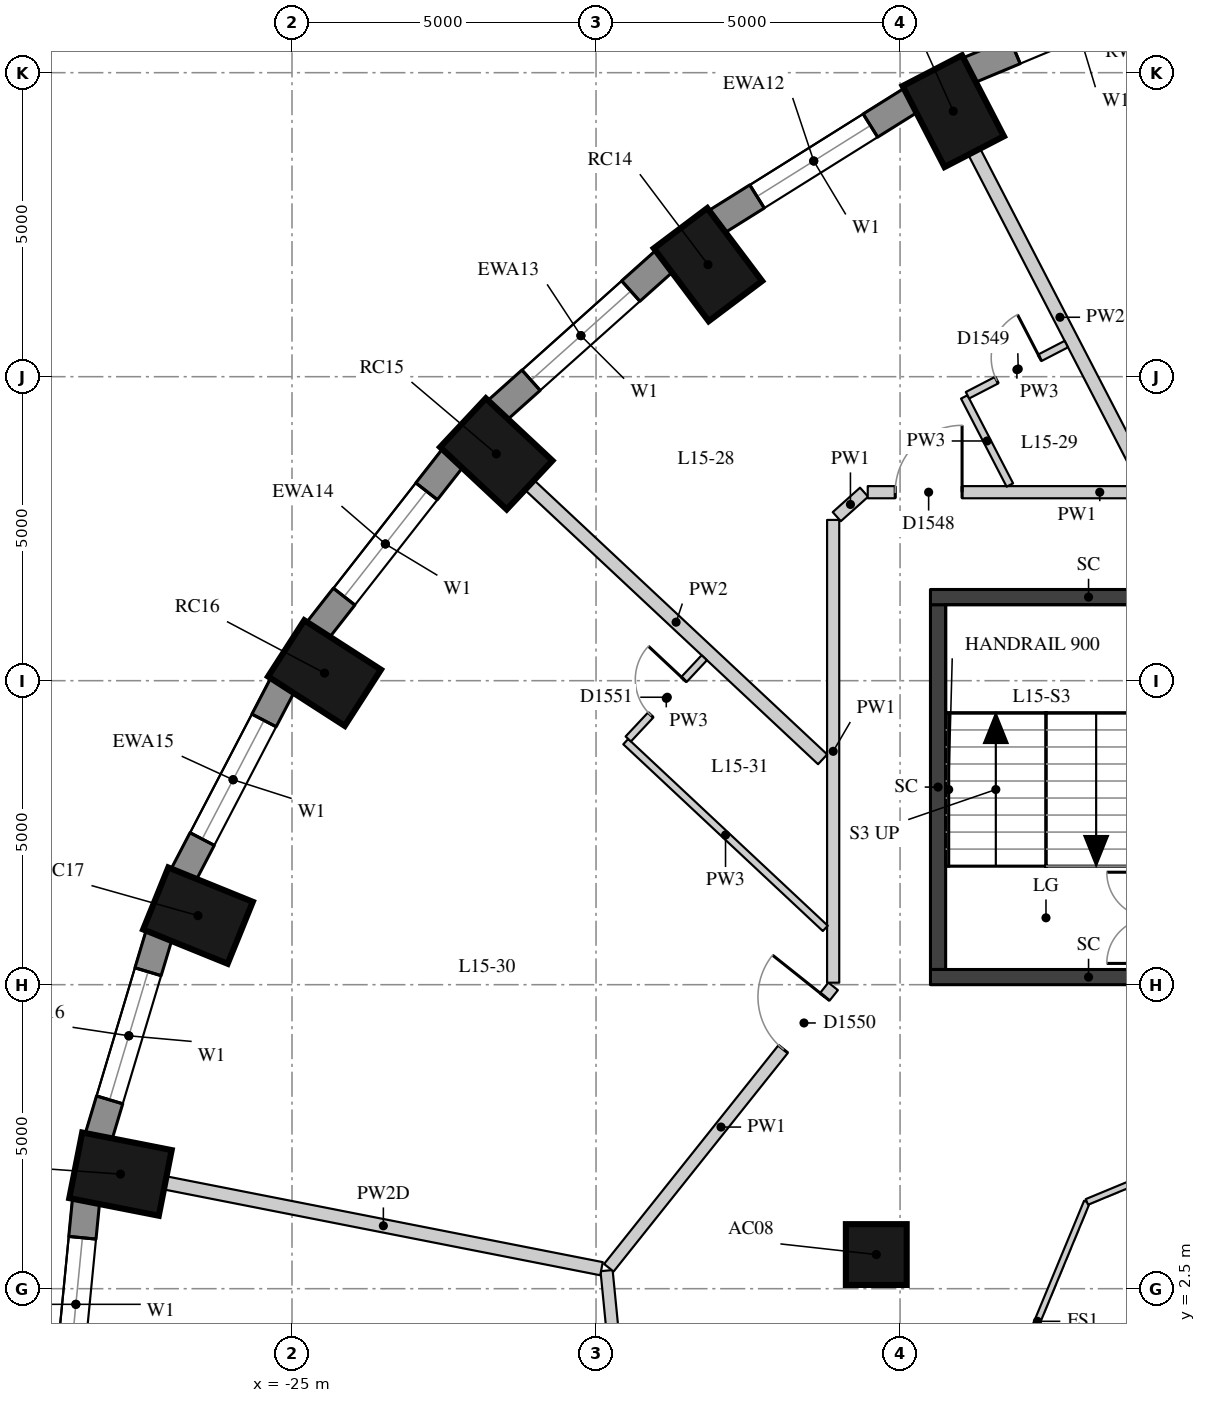
"""IFC4 building model, lengths in metres.
Left out: names, types, materials, properties, quantities, classifications, styles, units other than length and angle.
Written with IfcOpenShell. Run it as: python <this file> out.ifc"""

import sys

from ifc_helpers import new_model, si_unit, direction, frame, frame_2d, origin, origin_2d, place, context, subcontext, project, spatial, rectangle, extrude, element, fill, save


model = new_model("IFC4")
c1 = context("Model", 3, precision=1e-05, world=origin(), true_north=direction((0.0, 1.0)))
c2 = subcontext(c1, "Body", "Model", "MODEL_VIEW")
j1 = project(units=[si_unit("LENGTHUNIT", "METRE"), si_unit("PLANEANGLEUNIT", "RADIAN")], contexts=[c1])
p1 = place(None, origin())
s1 = spatial("IfcSite", under=j1, at=p1, CompositionType="ELEMENT")
p2 = place(p1, origin())
s2 = spatial("IfcBuilding", under=s1, at=p2, CompositionType="ELEMENT")
p3 = place(p2, frame((0.0, 0.0, 58.0)))
s3 = spatial("IfcBuildingStorey", under=s2, at=p3, CompositionType="ELEMENT", Elevation=58.0)
for number, where, z_axis, x_axis in (
    (1, (-14.125, 21.867, 0.0), (0.0, 0.0, 1.0), (-0.46, 0.888, 0.0)),
    (2, (-18.159, 19.343, 0.0), (0.0, 0.0, 1.0), (-0.601, 0.799, 0.0)),
    (3, (-21.641, 16.23, 0.0), (0.0, 0.0, 1.0), (-0.73, 0.683, 0.0)),
    (4, (-24.465, 12.625, 0.0), (0.0, 0.0, 1.0), (-0.841, 0.541, 0.0)),
    (5, (-26.546, 8.636, 0.0), (0.0, 0.0, 1.0), (-0.927, 0.376, 0.0)),
    (6, (-27.821, 4.385, 0.0), (0.0, 0.0, 1.0), (-0.981, 0.193, 0.0)),
):
    element("IfcColumn", number, at=place(p3, frame(where, z_axis=z_axis, x_axis=x_axis)), inside=s3, PredefinedType="COLUMN", context=c2, shape_type="SweptSolid", body=[
        extrude(rectangle(XDim=1.5, YDim=1.1, at=origin_2d()), origin(), (0.0, 0.0, 1.0), 3.3),
    ])
p4 = place(p3, frame((-15.391, 3.062, 0.0), z_axis=(0.0, 0.0, 1.0), x_axis=(1.0, 0.0, 0.0)))
e7 = element("IfcColumn", 7, at=p4, inside=s3, PredefinedType="COLUMN", context=c2, shape_type="SweptSolid", body=[
    extrude(rectangle(XDim=1.0, YDim=1.0, at=origin_2d()), origin(), (0.0, 0.0, 1.0), 3.3),
])
p5 = place(p3, frame((-10.315, 24.021, 0.0), z_axis=(0.0, 0.0, 1.0), x_axis=(-0.923031964282, -0.384723267966, 0.0)))
e8 = element("IfcWall", 8, at=p5, inside=s3, PredefinedType="SOLIDWALL", context=c2, shape_type="SweptSolid", body=[
    extrude(rectangle(XDim=3.856, YDim=0.45, at=frame_2d((1.928, 0.0))), origin(), (0.0, 0.0, 1.0), 3.02),
])
p6 = place(p5, frame((0.828, 0.0, 0.4)))
e9 = element("IfcOpeningElement", 9, at=p6, cuts=e8, PredefinedType="OPENING", context=c2, shape_type="SweptSolid", body=[
    extrude(rectangle(XDim=2.2, YDim=1.75, at=frame_2d((1.1, 0.875))), frame((0.0, 0.235, 0.0), z_axis=(0.0, -1.0, 0.0), x_axis=(1.0, 0.0, 0.0)), (0.0, 0.0, 1.0), 0.47),
])
p7 = place(p3, frame((-14.817, 22.051, 0.0), z_axis=(0.0, 0.0, 1.0), x_axis=(-0.847635480093, -0.530579016629, 0.0)))
e10 = element("IfcWall", 10, at=p7, inside=s3, PredefinedType="SOLIDWALL", context=c2, shape_type="SweptSolid", body=[
    extrude(rectangle(XDim=3.782, YDim=0.45, at=frame_2d((1.891, 0.0))), origin(), (0.0, 0.0, 1.0), 3.02),
])
p8 = place(p7, frame((0.791, 0.0, 0.4)))
e11 = element("IfcOpeningElement", 11, at=p8, cuts=e10, PredefinedType="OPENING", context=c2, shape_type="SweptSolid", body=[
    extrude(rectangle(XDim=2.2, YDim=1.75, at=frame_2d((1.1, 0.875))), frame((0.0, 0.235, 0.0), z_axis=(0.0, -1.0, 0.0), x_axis=(1.0, 0.0, 0.0)), (0.0, 0.0, 1.0), 0.47),
])
p9 = place(p3, frame((-18.871, 19.407, 0.0), z_axis=(0.0, 0.0, 1.0), x_axis=(-0.745526233716, -0.66647628228, 0.0)))
e12 = element("IfcWall", 12, at=p9, inside=s3, PredefinedType="SOLIDWALL", context=c2, shape_type="SweptSolid", body=[
    extrude(rectangle(XDim=3.697, YDim=0.45, at=frame_2d((1.848, 0.0))), origin(), (0.0, 0.0, 1.0), 3.02),
])
p10 = place(p9, frame((0.749, 0.0, 0.4)))
e13 = element("IfcOpeningElement", 13, at=p10, cuts=e12, PredefinedType="OPENING", context=c2, shape_type="SweptSolid", body=[
    extrude(rectangle(XDim=2.2, YDim=1.75, at=frame_2d((1.1, 0.875))), frame((0.0, 0.235, 0.0), z_axis=(0.0, -1.0, 0.0), x_axis=(1.0, 0.0, 0.0)), (0.0, 0.0, 1.0), 0.47),
])
p11 = place(p3, frame((-22.352, 16.17, 0.0), z_axis=(0.0, 0.0, 1.0), x_axis=(-0.616661975264, -0.787228053529, 0.0)))
e14 = element("IfcWall", 14, at=p11, inside=s3, PredefinedType="SOLIDWALL", context=c2, shape_type="SweptSolid", body=[
    extrude(rectangle(XDim=3.61, YDim=0.45, at=frame_2d((1.805, 0.0))), origin(), (0.0, 0.0, 1.0), 3.02),
])
p12 = place(p11, frame((0.705, 0.0, 0.4)))
e15 = element("IfcOpeningElement", 15, at=p12, cuts=e14, PredefinedType="OPENING", context=c2, shape_type="SweptSolid", body=[
    extrude(rectangle(XDim=2.2, YDim=1.75, at=frame_2d((1.1, 0.875))), frame((0.0, 0.235, 0.0), z_axis=(0.0, -1.0, 0.0), x_axis=(1.0, 0.0, 0.0)), (0.0, 0.0, 1.0), 0.47),
])
p13 = place(p3, frame((-25.152, 12.437, 0.0), z_axis=(0.0, 0.0, 1.0), x_axis=(-0.462492775226, -0.886623050041, 0.0)))
e16 = element("IfcWall", 16, at=p13, inside=s3, PredefinedType="SOLIDWALL", context=c2, shape_type="SweptSolid", body=[
    extrude(rectangle(XDim=3.532, YDim=0.45, at=frame_2d((1.766, 0.0))), origin(), (0.0, 0.0, 1.0), 3.02),
])
p14 = place(p13, frame((0.666, 0.0, 0.4)))
e17 = element("IfcOpeningElement", 17, at=p14, cuts=e16, PredefinedType="OPENING", context=c2, shape_type="SweptSolid", body=[
    extrude(rectangle(XDim=2.2, YDim=1.75, at=frame_2d((1.1, 0.875))), frame((0.0, 0.235, 0.0), z_axis=(0.0, -1.0, 0.0), x_axis=(1.0, 0.0, 0.0)), (0.0, 0.0, 1.0), 0.47),
])
p15 = place(p3, frame((-27.185, 8.323, 0.0), z_axis=(0.0, 0.0, 1.0), x_axis=(-0.287064133733, -0.957911364963, 0.0)))
e18 = element("IfcWall", 18, at=p15, inside=s3, PredefinedType="SOLIDWALL", context=c2, shape_type="SweptSolid", body=[
    extrude(rectangle(XDim=3.473, YDim=0.45, at=frame_2d((1.737, 0.0))), origin(), (0.0, 0.0, 1.0), 3.02),
])
p16 = place(p15, frame((0.637, 0.0, 0.4)))
e19 = element("IfcOpeningElement", 19, at=p16, cuts=e18, PredefinedType="OPENING", context=c2, shape_type="SweptSolid", body=[
    extrude(rectangle(XDim=2.2, YDim=1.75, at=frame_2d((1.1, 0.875))), frame((0.0, 0.235, 0.0), z_axis=(0.0, -1.0, 0.0), x_axis=(1.0, 0.0, 0.0)), (0.0, 0.0, 1.0), 0.47),
])
p17 = place(p3, frame((-28.387, 3.956, 0.0), z_axis=(0.0, 0.0, 1.0), x_axis=(-0.097389581596, -0.995246336038, 0.0)))
e20 = element("IfcWall", 20, at=p17, inside=s3, PredefinedType="SOLIDWALL", context=c2, shape_type="SweptSolid", body=[
    extrude(rectangle(XDim=3.442, YDim=0.45, at=frame_2d((1.721, 0.0))), origin(), (0.0, 0.0, 1.0), 3.02),
])
p18 = place(p17, frame((0.621, 0.0, 0.4)))
e21 = element("IfcOpeningElement", 21, at=p18, cuts=e20, PredefinedType="OPENING", context=c2, shape_type="SweptSolid", body=[
    extrude(rectangle(XDim=2.2, YDim=1.75, at=frame_2d((1.1, 0.875))), frame((0.0, 0.235, 0.0), z_axis=(0.0, -1.0, 0.0), x_axis=(1.0, 0.0, 0.0)), (0.0, 0.0, 1.0), 0.47),
])
p19 = place(p3, frame((-14.375, 7.75, -0.28), z_axis=(0.0, 0.0, 1.0), x_axis=(0.0, 1.0, 0.0)))
e22 = element("IfcWall", 22, at=p19, inside=s3, PredefinedType="SHEAR", context=c2, shape_type="SweptSolid", body=[
    extrude(rectangle(XDim=6.0, YDim=0.25, at=frame_2d((3.0, 0.0))), origin(), (0.0, 0.0, 1.0), 3.3),
])
for number, where, z_axis, x_axis in (
    (23, (-14.5, 13.875, -0.28), (0.0, 0.0, 1.0), (1.0, 0.0, 0.0)),
    (24, (-14.5, 7.625, -0.28), (0.0, 0.0, 1.0), (1.0, 0.0, 0.0)),
):
    element("IfcWall", number, at=place(p3, frame(where, z_axis=z_axis, x_axis=x_axis)), inside=s3, PredefinedType="SHEAR", context=c2, shape_type="SweptSolid", body=[
        extrude(rectangle(XDim=5.2, YDim=0.25, at=frame_2d((2.6, 0.0))), origin(), (0.0, 0.0, 1.0), 3.3),
    ])
p20 = place(p3, frame((-19.014, -5.445, 0.0), z_axis=(0.0, 0.0, 1.0), x_axis=(-0.098076369896, 0.995178891289, 0.0)))
e25 = element("IfcWall", 25, at=p20, inside=s3, PredefinedType="PARTITIONING", context=c2, shape_type="SweptSolid", body=[
    extrude(rectangle(XDim=8.282, YDim=0.2, at=frame_2d((4.141, 0.0))), origin(), (0.0, 0.0, 1.0), 3.02),
])
p21 = place(p20, frame((2.142, 0.0, 0.0)))
e26 = element("IfcOpeningElement", 26, at=p21, cuts=e25, PredefinedType="OPENING", context=c2, shape_type="SweptSolid", body=[
    extrude(rectangle(XDim=1.1, YDim=2.1, at=frame_2d((0.55, 1.05))), frame((0.0, 0.11, 0.0), z_axis=(0.0, -1.0, 0.0), x_axis=(1.0, 0.0, 0.0)), (0.0, 0.0, 1.0), 0.22),
])
p22 = place(p3, frame((-19.789, 2.844, 0.0), z_axis=(0.0, 0.0, 1.0), x_axis=(0.623300670662, 0.781982272147, 0.0)))
e27 = element("IfcWall", 27, at=p22, inside=s3, PredefinedType="PARTITIONING", context=c2, shape_type="SweptSolid", body=[
    extrude(rectangle(XDim=5.919, YDim=0.2, at=frame_2d((2.959, 0.0))), origin(), (0.0, 0.0, 1.0), 3.02),
])
p23 = place(p22, frame((4.599, 0.0, 0.0)))
e28 = element("IfcOpeningElement", 28, at=p23, cuts=e27, PredefinedType="OPENING", context=c2, shape_type="SweptSolid", body=[
    extrude(rectangle(XDim=1.1, YDim=2.1, at=frame_2d((0.55, 1.05))), frame((0.0, 0.11, 0.0), z_axis=(0.0, -1.0, 0.0), x_axis=(1.0, 0.0, 0.0)), (0.0, 0.0, 1.0), 0.22),
])
p24 = place(p3, frame((-16.1, 7.533, 0.0), z_axis=(0.0, 0.0, 1.0), x_axis=(0.0, 1.0, 0.0)))
e29 = element("IfcWall", 29, at=p24, inside=s3, PredefinedType="PARTITIONING", context=c2, shape_type="SweptSolid", body=[
    extrude(rectangle(XDim=7.611, YDim=0.2, at=frame_2d((3.806, 0.0))), origin(), (0.0, 0.0, 1.0), 3.02),
])
p25 = place(p3, frame((-16.041, 15.198, 0.0), z_axis=(0.0, 0.0, 1.0), x_axis=(0.744722115519, 0.667374685359, 0.0)))
e30 = element("IfcWall", 30, at=p25, inside=s3, PredefinedType="PARTITIONING", context=c2, shape_type="SweptSolid", body=[
    extrude(rectangle(XDim=0.603, YDim=0.2, at=frame_2d((0.301, 0.0))), origin(), (0.0, 0.0, 1.0), 3.02),
])
p26 = place(p3, frame((-15.531, 15.6, 0.0), z_axis=(0.0, 0.0, 1.0), x_axis=(1.0, 0.0, 0.0)))
e31 = element("IfcWall", 31, at=p26, inside=s3, PredefinedType="PARTITIONING", context=c2, shape_type="SweptSolid", body=[
    extrude(rectangle(XDim=7.632, YDim=0.2, at=frame_2d((3.816, 0.0))), origin(), (0.0, 0.0, 1.0), 3.02),
])
p27 = place(p26, frame((5.283, 0.0, 0.0)))
e32 = element("IfcOpeningElement", 32, at=p27, cuts=e31, PredefinedType="OPENING", context=c2, shape_type="SweptSolid", body=[
    extrude(rectangle(XDim=1.0, YDim=2.1, at=frame_2d((0.5, 1.05))), frame((0.0, 0.11, 0.0), z_axis=(0.0, -1.0, 0.0), x_axis=(1.0, 0.0, 0.0)), (0.0, 0.0, 1.0), 0.22),
])
p28 = place(p26, frame((0.451, 0.0, 0.0)))
e33 = element("IfcOpeningElement", 33, at=p28, cuts=e31, PredefinedType="OPENING", context=c2, shape_type="SweptSolid", body=[
    extrude(rectangle(XDim=1.1, YDim=2.1, at=frame_2d((0.55, 1.05))), frame((0.0, 0.11, 0.0), z_axis=(0.0, -1.0, 0.0), x_axis=(1.0, 0.0, 0.0)), (0.0, 0.0, 1.0), 0.22),
])
p29 = place(p3, frame((-13.78, 21.201, 0.0), z_axis=(0.0, 0.0, 1.0), x_axis=(0.459699000582, -0.888074787878, 0.0)))
e34 = element("IfcWall", 34, at=p29, inside=s3, PredefinedType="PARTITIONING", context=c2, shape_type="SweptSolid", body=[
    extrude(rectangle(XDim=6.134, YDim=0.22, at=frame_2d((3.067, 0.0))), origin(), (0.0, 0.0, 1.0), 3.02),
])
p30 = place(p3, frame((-21.093, 15.718, 0.0), z_axis=(0.0, 0.0, 1.0), x_axis=(0.73009284205, -0.683347965525, 0.0)))
e35 = element("IfcWall", 35, at=p30, inside=s3, PredefinedType="PARTITIONING", context=c2, shape_type="SweptSolid", body=[
    extrude(rectangle(XDim=6.602, YDim=0.22, at=frame_2d((3.301, 0.0))), origin(), (0.0, 0.0, 1.0), 3.02),
])
p31 = place(p3, frame((-27.085, 4.24, 0.0), z_axis=(0.0, 0.0, 1.0), x_axis=(0.981202333999, -0.192981811981, 0.0)))
e36 = element("IfcWall", 36, at=p31, inside=s3, PredefinedType="PARTITIONING", context=c2, shape_type="SweptSolid", body=[
    extrude(rectangle(XDim=7.312, YDim=0.22, at=frame_2d((3.656, 0.0))), origin(), (0.0, 0.0, 1.0), 2.47),
])
p32 = place(p3, frame((-13.194, 15.718, 0.0), z_axis=(0.0, 0.0, 1.0), x_axis=(-0.459736274936, 0.888055492359, 0.0)))
e37 = element("IfcWall", 37, at=p32, inside=s3, PredefinedType="PARTITIONING", context=c2, shape_type="SweptSolid", body=[
    extrude(rectangle(XDim=1.632, YDim=0.12, at=frame_2d((0.816, 0.0))), origin(), (0.0, 0.0, 1.0), 3.02),
])
p33 = place(p3, frame((-16.229, 8.426, 0.0), z_axis=(0.0, 0.0, 1.0), x_axis=(-0.730077325201, 0.683364543438, 0.0)))
e38 = element("IfcWall", 38, at=p33, inside=s3, PredefinedType="PARTITIONING", context=c2, shape_type="SweptSolid", body=[
    extrude(rectangle(XDim=4.495, YDim=0.12, at=frame_2d((2.247, 0.0))), origin(), (0.0, 0.0, 1.0), 3.02),
])
p34 = place(p3, frame((-13.891, 17.195, 0.0), z_axis=(0.0, 0.0, 1.0), x_axis=(0.88806930088, 0.459709600546, 0.0)))
e39 = element("IfcWall", 39, at=p34, inside=s3, PredefinedType="PARTITIONING", context=c2, shape_type="SweptSolid", body=[
    extrude(rectangle(XDim=1.83, YDim=0.12, at=frame_2d((0.915, 0.0))), origin(), (0.0, 0.0, 1.0), 3.02),
])
p35 = place(p34, frame((0.54, 0.0, 0.0)))
e40 = element("IfcOpeningElement", 40, at=p35, cuts=e39, PredefinedType="OPENING", context=c2, shape_type="SweptSolid", body=[
    extrude(rectangle(XDim=0.8, YDim=2.1, at=frame_2d((0.4, 1.05))), frame((0.0, 0.07, 0.0), z_axis=(0.0, -1.0, 0.0), x_axis=(1.0, 0.0, 0.0)), (0.0, 0.0, 1.0), 0.14),
])
p36 = place(p3, frame((-19.47, 11.542, 0.0), z_axis=(0.0, 0.0, 1.0), x_axis=(0.683306289544, 0.730131847456, 0.0)))
e41 = element("IfcWall", 41, at=p36, inside=s3, PredefinedType="PARTITIONING", context=c2, shape_type="SweptSolid", body=[
    extrude(rectangle(XDim=1.83, YDim=0.12, at=frame_2d((0.915, 0.0))), origin(), (0.0, 0.0, 1.0), 3.02),
])
p37 = place(p36, frame((0.54, 0.0, 0.0)))
e42 = element("IfcOpeningElement", 42, at=p37, cuts=e41, PredefinedType="OPENING", context=c2, shape_type="SweptSolid", body=[
    extrude(rectangle(XDim=0.8, YDim=2.1, at=frame_2d((0.4, 1.05))), frame((0.0, 0.07, 0.0), z_axis=(0.0, -1.0, 0.0), x_axis=(1.0, 0.0, 0.0)), (0.0, 0.0, 1.0), 0.14),
])
for number, where, z_axis, x_axis in (
    (43, (-13.554, 0.0, 0.0), (0.0, 0.0, 1.0), (0.383, 0.924, 0.0)),
    (44, (-11.927, 3.927, 0.0), (0.0, 0.0, 1.0), (0.924, 0.383, 0.0)),
):
    element("IfcWall", number, at=place(p3, frame(where, z_axis=z_axis, x_axis=x_axis)), inside=s3, PredefinedType="PARTITIONING", context=c2, shape_type="SweptSolid", body=[
        extrude(rectangle(XDim=4.251, YDim=0.1, at=frame_2d((2.125, 0.0))), origin(), (0.0, 0.0, 1.0), 3.02),
    ])
p38 = place(p6, origin())
e45 = element("IfcWindow", 45, at=p38, inside=s3, PartitioningType="SINGLE_PANEL", PredefinedType="WINDOW", context=c2, shape_type="SweptSolid", body=[
    extrude(rectangle(XDim=2.2, YDim=1.75, at=frame_2d((1.1, 0.875))), frame((0.0, 0.035, 0.0), z_axis=(0.0, -1.0, 0.0), x_axis=(1.0, 0.0, 0.0)), (0.0, 0.0, 1.0), 0.06),
])
fill(e9, e45)
p39 = place(p8, origin())
e46 = element("IfcWindow", 46, at=p39, inside=s3, PartitioningType="SINGLE_PANEL", PredefinedType="WINDOW", context=c2, shape_type="SweptSolid", body=[
    extrude(rectangle(XDim=2.2, YDim=1.75, at=frame_2d((1.1, 0.875))), frame((0.0, 0.035, 0.0), z_axis=(0.0, -1.0, 0.0), x_axis=(1.0, 0.0, 0.0)), (0.0, 0.0, 1.0), 0.06),
])
fill(e11, e46)
p40 = place(p10, origin())
e47 = element("IfcWindow", 47, at=p40, inside=s3, PartitioningType="SINGLE_PANEL", PredefinedType="WINDOW", context=c2, shape_type="SweptSolid", body=[
    extrude(rectangle(XDim=2.2, YDim=1.75, at=frame_2d((1.1, 0.875))), frame((0.0, 0.035, 0.0), z_axis=(0.0, -1.0, 0.0), x_axis=(1.0, 0.0, 0.0)), (0.0, 0.0, 1.0), 0.06),
])
fill(e13, e47)
p41 = place(p12, origin())
e48 = element("IfcWindow", 48, at=p41, inside=s3, PartitioningType="SINGLE_PANEL", PredefinedType="WINDOW", context=c2, shape_type="SweptSolid", body=[
    extrude(rectangle(XDim=2.2, YDim=1.75, at=frame_2d((1.1, 0.875))), frame((0.0, 0.035, 0.0), z_axis=(0.0, -1.0, 0.0), x_axis=(1.0, 0.0, 0.0)), (0.0, 0.0, 1.0), 0.06),
])
fill(e15, e48)
p42 = place(p14, origin())
e49 = element("IfcWindow", 49, at=p42, inside=s3, PartitioningType="SINGLE_PANEL", PredefinedType="WINDOW", context=c2, shape_type="SweptSolid", body=[
    extrude(rectangle(XDim=2.2, YDim=1.75, at=frame_2d((1.1, 0.875))), frame((0.0, 0.035, 0.0), z_axis=(0.0, -1.0, 0.0), x_axis=(1.0, 0.0, 0.0)), (0.0, 0.0, 1.0), 0.06),
])
fill(e17, e49)
p43 = place(p16, origin())
e50 = element("IfcWindow", 50, at=p43, inside=s3, PartitioningType="SINGLE_PANEL", PredefinedType="WINDOW", context=c2, shape_type="SweptSolid", body=[
    extrude(rectangle(XDim=2.2, YDim=1.75, at=frame_2d((1.1, 0.875))), frame((0.0, 0.035, 0.0), z_axis=(0.0, -1.0, 0.0), x_axis=(1.0, 0.0, 0.0)), (0.0, 0.0, 1.0), 0.06),
])
fill(e19, e50)
p44 = place(p18, origin())
e51 = element("IfcWindow", 51, at=p44, inside=s3, PartitioningType="SINGLE_PANEL", PredefinedType="WINDOW", context=c2, shape_type="SweptSolid", body=[
    extrude(rectangle(XDim=2.2, YDim=1.75, at=frame_2d((1.1, 0.875))), frame((0.0, 0.035, 0.0), z_axis=(0.0, -1.0, 0.0), x_axis=(1.0, 0.0, 0.0)), (0.0, 0.0, 1.0), 0.06),
])
fill(e21, e51)
p45 = place(p28, origin())
e52 = element("IfcDoor", 52, at=p45, inside=s3, OperationType="SINGLE_SWING_RIGHT", PredefinedType="DOOR", context=c2, shape_type="SweptSolid", body=[
    extrude(rectangle(XDim=1.1, YDim=2.1, at=frame_2d((0.55, 1.05))), frame((0.0, 0.025, 0.0), z_axis=(0.0, -1.0, 0.0), x_axis=(1.0, 0.0, 0.0)), (0.0, 0.0, 1.0), 0.05),
])
fill(e33, e52)
p46 = place(p35, origin())
e53 = element("IfcDoor", 53, at=p46, inside=s3, OperationType="SINGLE_SWING_RIGHT", PredefinedType="DOOR", context=c2, shape_type="SweptSolid", body=[
    extrude(rectangle(XDim=0.8, YDim=2.1, at=frame_2d((0.4, 1.05))), frame((0.0, 0.025, 0.0), z_axis=(0.0, -1.0, 0.0), x_axis=(1.0, 0.0, 0.0)), (0.0, 0.0, 1.0), 0.05),
])
fill(e40, e53)
p47 = place(p23, origin())
e54 = element("IfcDoor", 54, at=p47, inside=s3, OperationType="SINGLE_SWING_RIGHT", PredefinedType="DOOR", context=c2, shape_type="SweptSolid", body=[
    extrude(rectangle(XDim=1.1, YDim=2.1, at=frame_2d((0.55, 1.05))), frame((0.0, 0.025, 0.0), z_axis=(0.0, -1.0, 0.0), x_axis=(1.0, 0.0, 0.0)), (0.0, 0.0, 1.0), 0.05),
])
fill(e28, e54)
p48 = place(p37, origin())
e55 = element("IfcDoor", 55, at=p48, inside=s3, OperationType="SINGLE_SWING_RIGHT", PredefinedType="DOOR", context=c2, shape_type="SweptSolid", body=[
    extrude(rectangle(XDim=0.8, YDim=2.1, at=frame_2d((0.4, 1.05))), frame((0.0, 0.025, 0.0), z_axis=(0.0, -1.0, 0.0), x_axis=(1.0, 0.0, 0.0)), (0.0, 0.0, 1.0), 0.05),
])
fill(e42, e55)
save(model, sys.argv[1])
